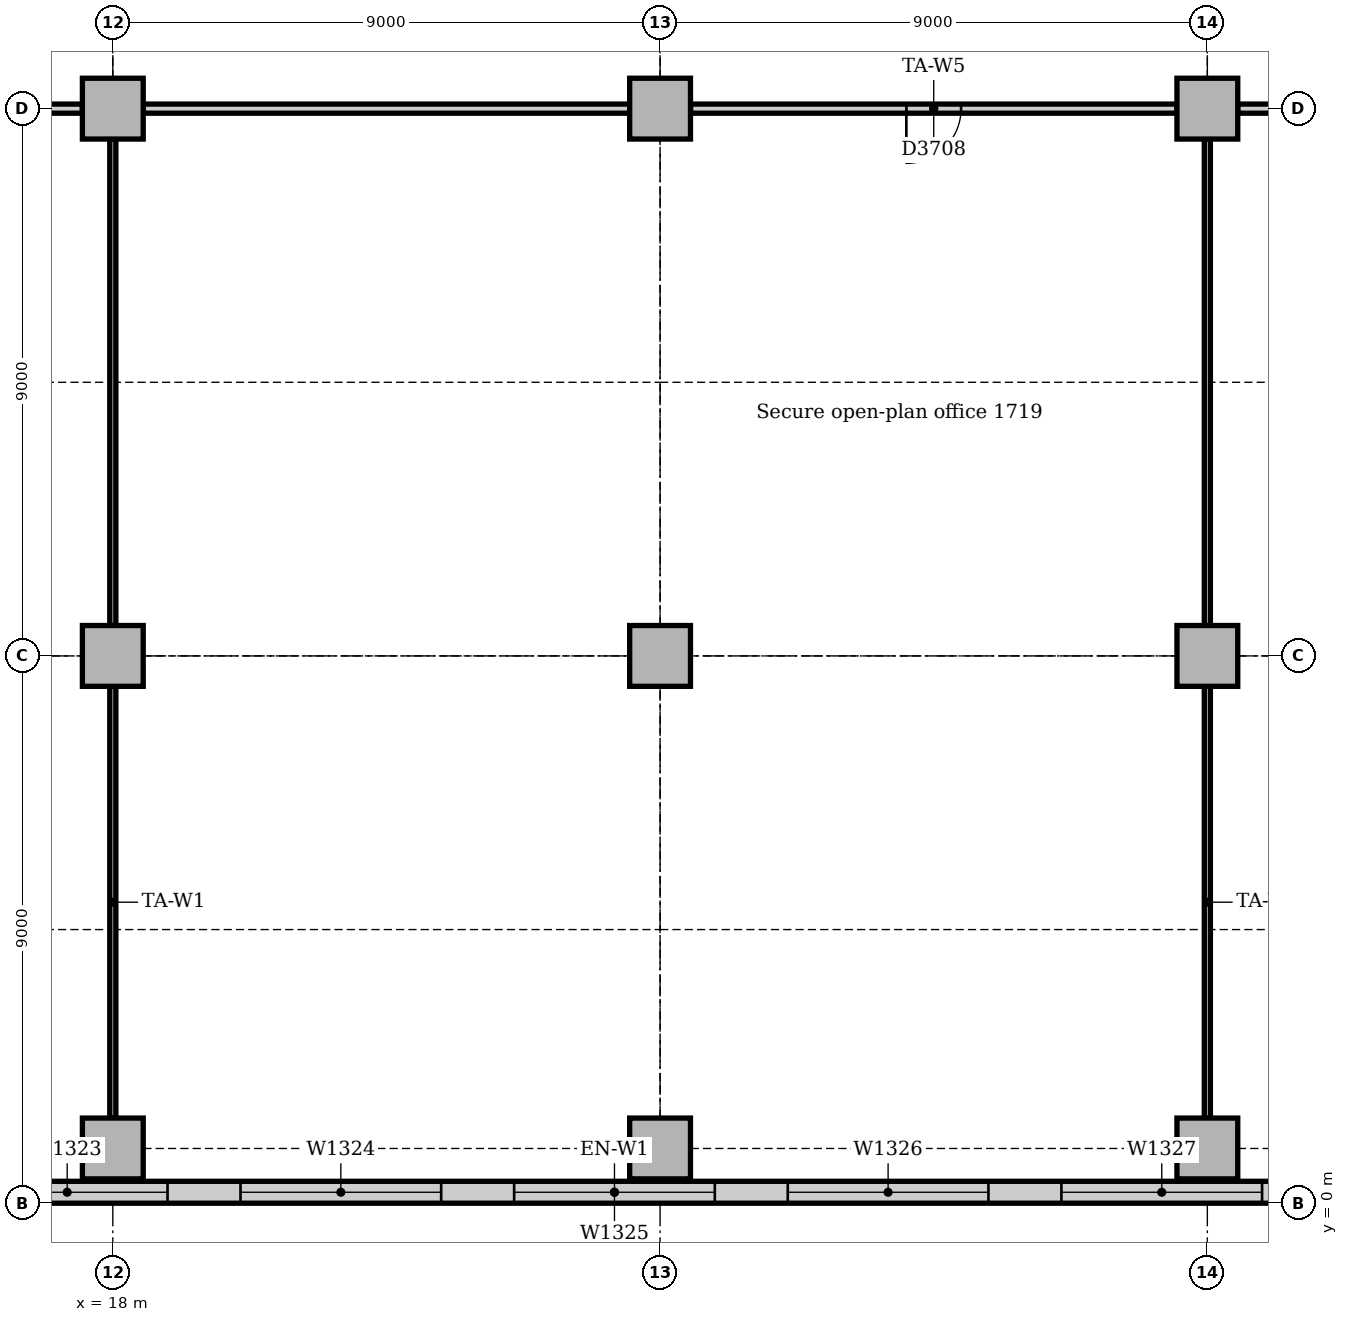
"""IFC4 building model, lengths in metres.
Left out: names, types, materials, properties, quantities, classifications, styles, units other than length and angle.
Written with IfcOpenShell. Run it as: python <this file> out.ifc"""

import sys

from ifc_helpers import new_model, si_unit, direction, frame, frame_2d, origin, origin_2d, place, context, subcontext, project, spatial, rectangle, extrude, element, fill, save


model = new_model("IFC4")
c1 = context("Model", 3, precision=1e-05, world=origin(), true_north=direction((0.0, 1.0)))
c2 = subcontext(c1, "Body", "Model", "MODEL_VIEW")
j1 = project(units=[si_unit("LENGTHUNIT", "METRE"), si_unit("PLANEANGLEUNIT", "RADIAN")], contexts=[c1])
p1 = place(None, origin())
s1 = spatial("IfcSite", under=j1, at=p1, CompositionType="ELEMENT")
p2 = place(p1, origin())
s2 = spatial("IfcBuilding", under=s1, at=p2, CompositionType="ELEMENT")
p3 = place(p2, frame((0.0, 0.0, 75.0)))
s3 = spatial("IfcBuildingStorey", under=s2, at=p3, CompositionType="ELEMENT", Elevation=75.0)
for number, where, z_axis, x_axis in (
    (1, (18.0, 0.9, 0.0), (0.0, 0.0, 1.0), (1.0, 0.0, 0.0)),
    (2, (27.0, 0.9, 0.0), (0.0, 0.0, 1.0), (1.0, 0.0, 0.0)),
    (3, (36.0, 0.9, 0.0), (0.0, 0.0, 1.0), (1.0, 0.0, 0.0)),
    (4, (18.0, 9.0, 0.0), (0.0, 0.0, 1.0), (1.0, 0.0, 0.0)),
    (5, (18.0, 18.0, 0.0), (0.0, 0.0, 1.0), (1.0, 0.0, 0.0)),
    (6, (27.0, 9.0, 0.0), (0.0, 0.0, 1.0), (1.0, 0.0, 0.0)),
    (7, (27.0, 18.0, 0.0), (0.0, 0.0, 1.0), (1.0, 0.0, 0.0)),
    (8, (36.0, 9.0, 0.0), (0.0, 0.0, 1.0), (1.0, 0.0, 0.0)),
    (9, (36.0, 18.0, 0.0), (0.0, 0.0, 1.0), (1.0, 0.0, 0.0)),
):
    element("IfcColumn", number, at=place(p3, frame(where, z_axis=z_axis, x_axis=x_axis)), inside=s3, PredefinedType="COLUMN", context=c2, shape_type="SweptSolid", body=[
        extrude(rectangle(XDim=1.0, YDim=1.0, at=origin_2d()), origin(), (0.0, 0.0, 1.0), 3.85),
    ])
p4 = place(p3, frame((4.243, 0.18, 0.0), z_axis=(0.0, 0.0, 1.0), x_axis=(1.0, 0.0, 0.0)))
e10 = element("IfcWall", 10, at=p4, inside=s3, PredefinedType="STANDARD", context=c2, shape_type="SweptSolid", body=[
    extrude(rectangle(XDim=44.015, YDim=0.36, at=frame_2d((22.007, 0.0))), origin(), (0.0, 0.0, 1.0), 3.85),
])
p5 = place(p4, frame((2.357, 0.0, 0.9)))
e11 = element("IfcOpeningElement", 11, at=p5, cuts=e10, PredefinedType="OPENING", context=c2, shape_type="SweptSolid", body=[
    extrude(rectangle(XDim=3.3, YDim=1.6, at=frame_2d((1.65, 0.8))), frame((0.0, 0.19, 0.0), z_axis=(0.0, -1.0, 0.0), x_axis=(1.0, 0.0, 0.0)), (0.0, 0.0, 1.0), 0.38),
])
p6 = place(p4, frame((6.857, 0.0, 0.9)))
e12 = element("IfcOpeningElement", 12, at=p6, cuts=e10, PredefinedType="OPENING", context=c2, shape_type="SweptSolid", body=[
    extrude(rectangle(XDim=3.3, YDim=1.6, at=frame_2d((1.65, 0.8))), frame((0.0, 0.19, 0.0), z_axis=(0.0, -1.0, 0.0), x_axis=(1.0, 0.0, 0.0)), (0.0, 0.0, 1.0), 0.38),
])
p7 = place(p4, frame((11.357, 0.0, 0.9)))
e13 = element("IfcOpeningElement", 13, at=p7, cuts=e10, PredefinedType="OPENING", context=c2, shape_type="SweptSolid", body=[
    extrude(rectangle(XDim=3.3, YDim=1.6, at=frame_2d((1.65, 0.8))), frame((0.0, 0.19, 0.0), z_axis=(0.0, -1.0, 0.0), x_axis=(1.0, 0.0, 0.0)), (0.0, 0.0, 1.0), 0.38),
])
p8 = place(p4, frame((15.857, 0.0, 0.9)))
e14 = element("IfcOpeningElement", 14, at=p8, cuts=e10, PredefinedType="OPENING", context=c2, shape_type="SweptSolid", body=[
    extrude(rectangle(XDim=3.3, YDim=1.6, at=frame_2d((1.65, 0.8))), frame((0.0, 0.19, 0.0), z_axis=(0.0, -1.0, 0.0), x_axis=(1.0, 0.0, 0.0)), (0.0, 0.0, 1.0), 0.38),
])
p9 = place(p4, frame((20.357, 0.0, 0.9)))
e15 = element("IfcOpeningElement", 15, at=p9, cuts=e10, PredefinedType="OPENING", context=c2, shape_type="SweptSolid", body=[
    extrude(rectangle(XDim=3.3, YDim=1.6, at=frame_2d((1.65, 0.8))), frame((0.0, 0.19, 0.0), z_axis=(0.0, -1.0, 0.0), x_axis=(1.0, 0.0, 0.0)), (0.0, 0.0, 1.0), 0.38),
])
p10 = place(p4, frame((24.857, 0.0, 0.9)))
e16 = element("IfcOpeningElement", 16, at=p10, cuts=e10, PredefinedType="OPENING", context=c2, shape_type="SweptSolid", body=[
    extrude(rectangle(XDim=3.3, YDim=1.6, at=frame_2d((1.65, 0.8))), frame((0.0, 0.19, 0.0), z_axis=(0.0, -1.0, 0.0), x_axis=(1.0, 0.0, 0.0)), (0.0, 0.0, 1.0), 0.38),
])
p11 = place(p4, frame((29.357, 0.0, 0.9)))
e17 = element("IfcOpeningElement", 17, at=p11, cuts=e10, PredefinedType="OPENING", context=c2, shape_type="SweptSolid", body=[
    extrude(rectangle(XDim=3.3, YDim=1.6, at=frame_2d((1.65, 0.8))), frame((0.0, 0.19, 0.0), z_axis=(0.0, -1.0, 0.0), x_axis=(1.0, 0.0, 0.0)), (0.0, 0.0, 1.0), 0.38),
])
p12 = place(p4, frame((33.857, 0.0, 0.9)))
e18 = element("IfcOpeningElement", 18, at=p12, cuts=e10, PredefinedType="OPENING", context=c2, shape_type="SweptSolid", body=[
    extrude(rectangle(XDim=3.3, YDim=1.6, at=frame_2d((1.65, 0.8))), frame((0.0, 0.19, 0.0), z_axis=(0.0, -1.0, 0.0), x_axis=(1.0, 0.0, 0.0)), (0.0, 0.0, 1.0), 0.38),
])
p13 = place(p4, frame((38.357, 0.0, 0.9)))
e19 = element("IfcOpeningElement", 19, at=p13, cuts=e10, PredefinedType="OPENING", context=c2, shape_type="SweptSolid", body=[
    extrude(rectangle(XDim=3.3, YDim=1.6, at=frame_2d((1.65, 0.8))), frame((0.0, 0.19, 0.0), z_axis=(0.0, -1.0, 0.0), x_axis=(1.0, 0.0, 0.0)), (0.0, 0.0, 1.0), 0.38),
])
p14 = place(p3, frame((36.5, 18.0, 0.0), z_axis=(0.0, 0.0, 1.0), x_axis=(1.0, 0.0, 0.0)))
e20 = element("IfcWall", 20, at=p14, inside=s3, PredefinedType="PARTITIONING", context=c2, shape_type="SweptSolid", body=[
    extrude(rectangle(XDim=8.0, YDim=0.15, at=frame_2d((4.0, 0.0))), origin(), (0.0, 0.0, 1.0), 3.15),
])
p15 = place(p3, frame((27.5, 18.0, 0.0), z_axis=(0.0, 0.0, 1.0), x_axis=(1.0, 0.0, 0.0)))
e21 = element("IfcWall", 21, at=p15, inside=s3, PredefinedType="PARTITIONING", context=c2, shape_type="SweptSolid", body=[
    extrude(rectangle(XDim=8.0, YDim=0.15, at=frame_2d((4.0, 0.0))), origin(), (0.0, 0.0, 1.0), 3.15),
])
p16 = place(p15, frame((3.55, 0.0, 0.0)))
e22 = element("IfcOpeningElement", 22, at=p16, cuts=e21, PredefinedType="OPENING", context=c2, shape_type="SweptSolid", body=[
    extrude(rectangle(XDim=0.9, YDim=2.1, at=frame_2d((0.45, 1.05))), frame((0.0, 0.085, 0.0), z_axis=(0.0, -1.0, 0.0), x_axis=(1.0, 0.0, 0.0)), (0.0, 0.0, 1.0), 0.17),
])
p17 = place(p3, frame((18.5, 18.0, 0.0), z_axis=(0.0, 0.0, 1.0), x_axis=(1.0, 0.0, 0.0)))
e23 = element("IfcWall", 23, at=p17, inside=s3, PredefinedType="PARTITIONING", context=c2, shape_type="SweptSolid", body=[
    extrude(rectangle(XDim=8.0, YDim=0.15, at=frame_2d((4.0, 0.0))), origin(), (0.0, 0.0, 1.0), 3.15),
])
p18 = place(p3, frame((9.5, 18.0, 0.0), z_axis=(0.0, 0.0, 1.0), x_axis=(1.0, 0.0, 0.0)))
e24 = element("IfcWall", 24, at=p18, inside=s3, PredefinedType="PARTITIONING", context=c2, shape_type="SweptSolid", body=[
    extrude(rectangle(XDim=8.0, YDim=0.15, at=frame_2d((4.0, 0.0))), origin(), (0.0, 0.0, 1.0), 3.15),
])
p19 = place(p18, frame((3.55, 0.0, 0.0)))
e25 = element("IfcOpeningElement", 25, at=p19, cuts=e24, PredefinedType="OPENING", context=c2, shape_type="SweptSolid", body=[
    extrude(rectangle(XDim=0.9, YDim=2.1, at=frame_2d((0.45, 1.05))), frame((0.0, 0.085, 0.0), z_axis=(0.0, -1.0, 0.0), x_axis=(1.0, 0.0, 0.0)), (0.0, 0.0, 1.0), 0.17),
])
p20 = place(p3, frame((18.0, 1.4, 0.0), z_axis=(0.0, 0.0, 1.0), x_axis=(0.0, 1.0, 0.0)))
e26 = element("IfcWall", 26, at=p20, inside=s3, PredefinedType="PARTITIONING", context=c2, shape_type="SweptSolid", body=[
    extrude(rectangle(XDim=7.1, YDim=0.1, at=frame_2d((3.55, 0.0))), origin(), (0.0, 0.0, 1.0), 3.158),
])
p21 = place(p3, frame((18.0, 9.5, 0.0), z_axis=(0.0, 0.0, 1.0), x_axis=(0.0, 1.0, 0.0)))
e27 = element("IfcWall", 27, at=p21, inside=s3, PredefinedType="PARTITIONING", context=c2, shape_type="SweptSolid", body=[
    extrude(rectangle(XDim=8.0, YDim=0.1, at=frame_2d((4.0, 0.0))), origin(), (0.0, 0.0, 1.0), 3.158),
])
p22 = place(p3, frame((36.0, 1.4, 0.0), z_axis=(0.0, 0.0, 1.0), x_axis=(0.0, 1.0, 0.0)))
e28 = element("IfcWall", 28, at=p22, inside=s3, PredefinedType="PARTITIONING", context=c2, shape_type="SweptSolid", body=[
    extrude(rectangle(XDim=7.1, YDim=0.1, at=frame_2d((3.55, 0.0))), origin(), (0.0, 0.0, 1.0), 3.158),
])
p23 = place(p3, frame((36.0, 9.5, 0.0), z_axis=(0.0, 0.0, 1.0), x_axis=(0.0, 1.0, 0.0)))
e29 = element("IfcWall", 29, at=p23, inside=s3, PredefinedType="PARTITIONING", context=c2, shape_type="SweptSolid", body=[
    extrude(rectangle(XDim=8.0, YDim=0.1, at=frame_2d((4.0, 0.0))), origin(), (0.0, 0.0, 1.0), 3.158),
])
p24 = place(p7, origin())
e30 = element("IfcWindow", 30, at=p24, inside=s3, PartitioningType="SINGLE_PANEL", PredefinedType="WINDOW", context=c2, shape_type="SweptSolid", body=[
    extrude(rectangle(XDim=3.3, YDim=1.6, at=frame_2d((1.65, 0.8))), frame((0.0, 0.13, 0.0), z_axis=(0.0, -1.0, 0.0), x_axis=(1.0, 0.0, 0.0)), (0.0, 0.0, 1.0), 0.06),
])
fill(e13, e30)
p25 = place(p8, origin())
e31 = element("IfcWindow", 31, at=p25, inside=s3, PartitioningType="SINGLE_PANEL", PredefinedType="WINDOW", context=c2, shape_type="SweptSolid", body=[
    extrude(rectangle(XDim=3.3, YDim=1.6, at=frame_2d((1.65, 0.8))), frame((0.0, 0.13, 0.0), z_axis=(0.0, -1.0, 0.0), x_axis=(1.0, 0.0, 0.0)), (0.0, 0.0, 1.0), 0.06),
])
fill(e14, e31)
p26 = place(p9, origin())
e32 = element("IfcWindow", 32, at=p26, inside=s3, PartitioningType="SINGLE_PANEL", PredefinedType="WINDOW", context=c2, shape_type="SweptSolid", body=[
    extrude(rectangle(XDim=3.3, YDim=1.6, at=frame_2d((1.65, 0.8))), frame((0.0, 0.13, 0.0), z_axis=(0.0, -1.0, 0.0), x_axis=(1.0, 0.0, 0.0)), (0.0, 0.0, 1.0), 0.06),
])
fill(e15, e32)
p27 = place(p10, origin())
e33 = element("IfcWindow", 33, at=p27, inside=s3, PartitioningType="SINGLE_PANEL", PredefinedType="WINDOW", context=c2, shape_type="SweptSolid", body=[
    extrude(rectangle(XDim=3.3, YDim=1.6, at=frame_2d((1.65, 0.8))), frame((0.0, 0.13, 0.0), z_axis=(0.0, -1.0, 0.0), x_axis=(1.0, 0.0, 0.0)), (0.0, 0.0, 1.0), 0.06),
])
fill(e16, e33)
p28 = place(p11, origin())
e34 = element("IfcWindow", 34, at=p28, inside=s3, PartitioningType="SINGLE_PANEL", PredefinedType="WINDOW", context=c2, shape_type="SweptSolid", body=[
    extrude(rectangle(XDim=3.3, YDim=1.6, at=frame_2d((1.65, 0.8))), frame((0.0, 0.13, 0.0), z_axis=(0.0, -1.0, 0.0), x_axis=(1.0, 0.0, 0.0)), (0.0, 0.0, 1.0), 0.06),
])
fill(e17, e34)
p29 = place(p16, frame((0.9, 0.0, 0.0), z_axis=(0.0, 0.0, 1.0), x_axis=(-1.0, 0.0, 0.0)))
e35 = element("IfcDoor", 35, at=p29, inside=s3, OperationType="SINGLE_SWING_RIGHT", PredefinedType="DOOR", context=c2, shape_type="SweptSolid", body=[
    extrude(rectangle(XDim=0.9, YDim=2.1, at=frame_2d((0.45, 1.05))), frame((0.0, 0.025, 0.0), z_axis=(0.0, -1.0, 0.0), x_axis=(1.0, 0.0, 0.0)), (0.0, 0.0, 1.0), 0.05),
])
fill(e22, e35)
save(model, sys.argv[1])
